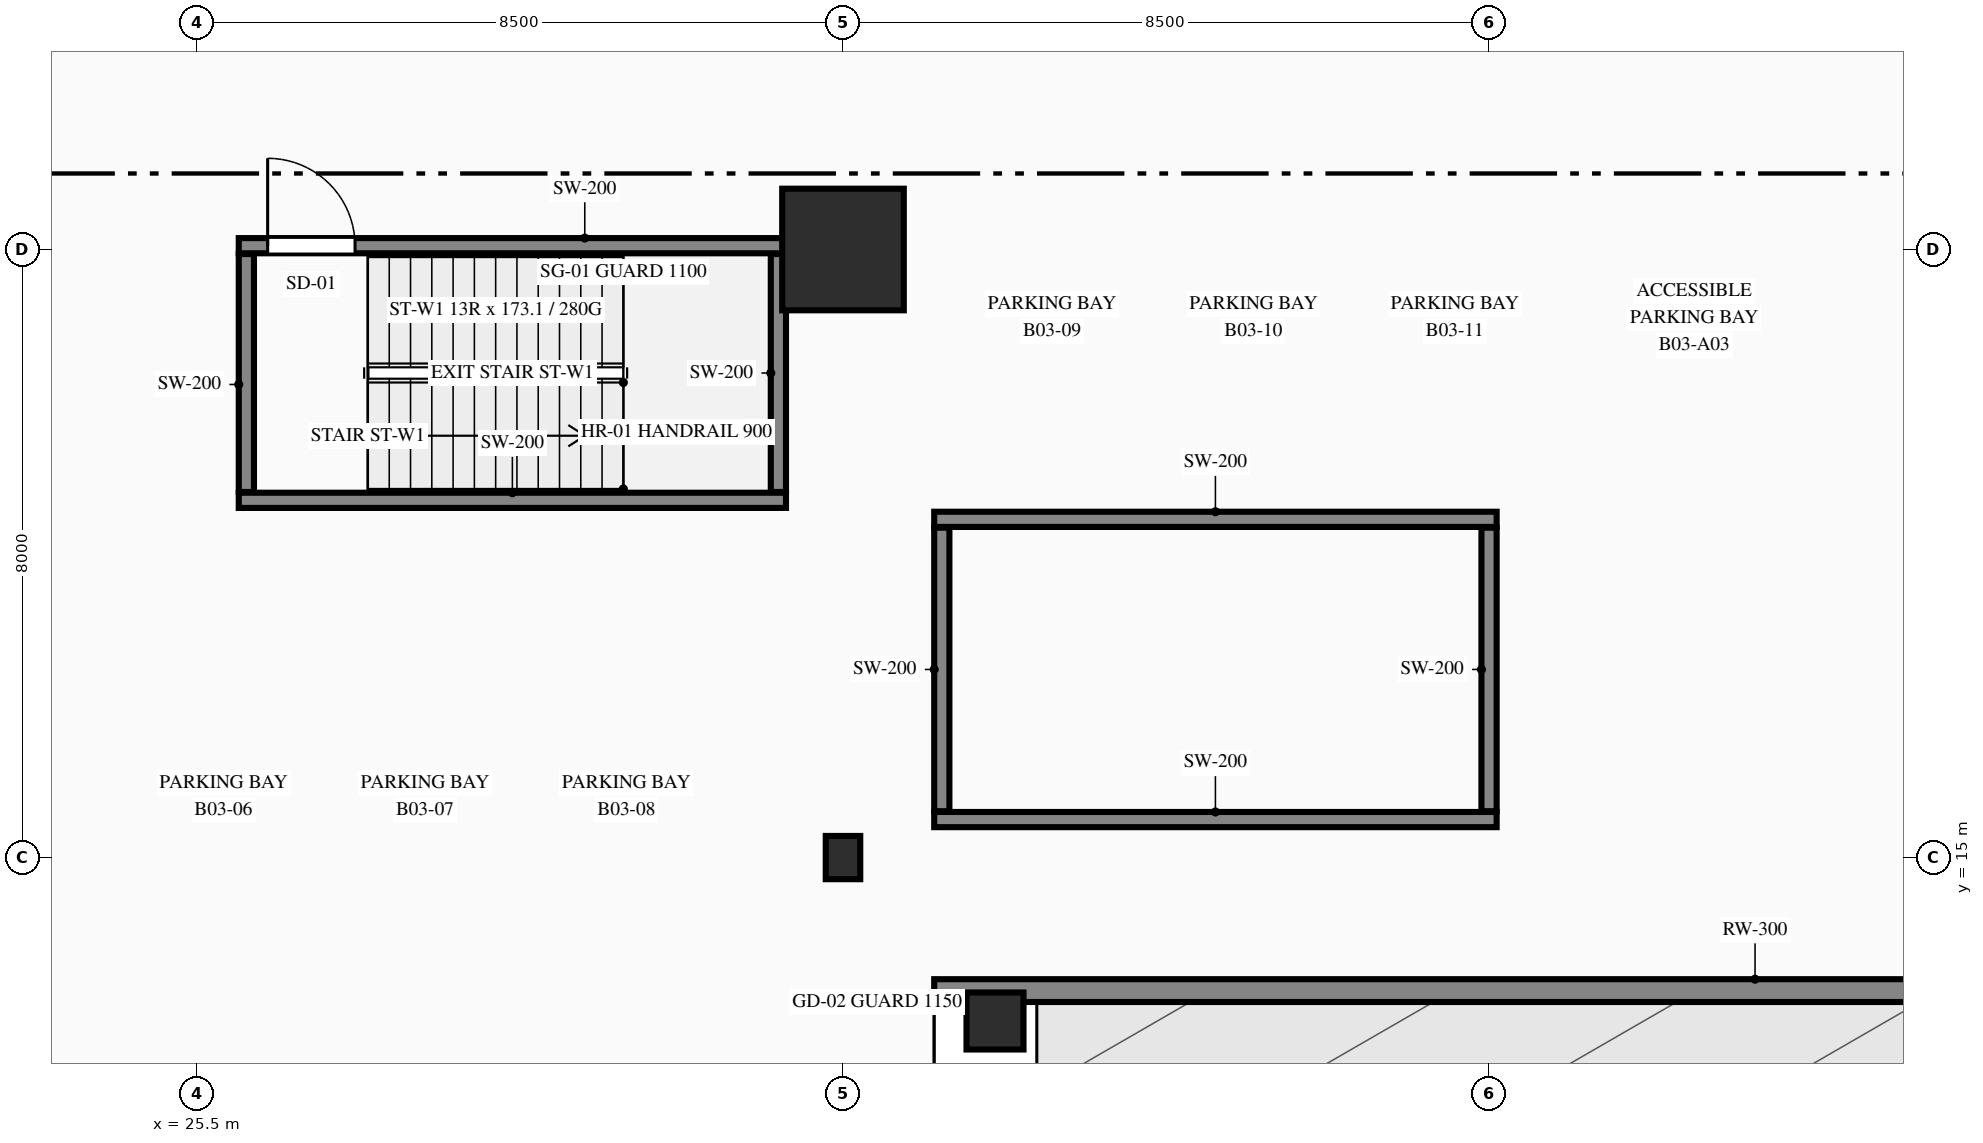
"""IFC4 building model, lengths in metres.
Left out: names, types, materials, properties, quantities, classifications, styles, units other than length and angle.
Written with IfcOpenShell. Run it as: python <this file> out.ifc"""

import sys

from ifc_helpers import new_model, si_unit, direction, frame, frame_2d, origin, origin_2d, place, context, subcontext, project, spatial, rectangle, i_section, extrude, element, fill, save


model = new_model("IFC4")
c1 = context("Model", 3, precision=1e-05, world=origin(), true_north=direction((0.0, 1.0)))
c2 = subcontext(c1, "Body", "Model", "MODEL_VIEW")
j1 = project(units=[si_unit("LENGTHUNIT", "METRE"), si_unit("PLANEANGLEUNIT", "RADIAN")], contexts=[c1])
p1 = place(None, origin())
s1 = spatial("IfcSite", under=j1, at=p1, CompositionType="ELEMENT")
p2 = place(p1, origin())
s2 = spatial("IfcBuilding", under=s1, at=p2, CompositionType="ELEMENT")
p3 = place(p2, frame((0.0, 0.0, -13.5)))
s3 = spatial("IfcBuildingStorey", under=s2, at=p3, CompositionType="ELEMENT", Elevation=-13.5)
p4 = place(p3, frame((26.05, 19.7, 0.0), z_axis=(0.0, 0.0, 1.0), x_axis=(1.0, 0.0, 0.0)))
e1 = element("IfcWall", 1, at=p4, inside=s3, PredefinedType="SHEAR", context=c2, shape_type="SweptSolid", body=[
    extrude(rectangle(XDim=7.2, YDim=0.2, at=frame_2d((3.6, 0.0))), origin(), (0.0, 0.0, 1.0), 4.5),
])
p5 = place(p3, frame((26.05, 23.05, 0.0), z_axis=(0.0, 0.0, 1.0), x_axis=(1.0, 0.0, 0.0)))
e2 = element("IfcWall", 2, at=p5, inside=s3, PredefinedType="SHEAR", context=c2, shape_type="SweptSolid", body=[
    extrude(rectangle(XDim=7.2, YDim=0.2, at=frame_2d((3.6, 0.0))), origin(), (0.0, 0.0, 1.0), 4.5),
])
p6 = place(p5, frame((0.38, 0.0, 0.0)))
e3 = element("IfcOpeningElement", 3, at=p6, cuts=e2, PredefinedType="OPENING", context=c2, shape_type="SweptSolid", body=[
    extrude(rectangle(XDim=1.15, YDim=2.2, at=frame_2d((0.575, 1.1))), frame((0.0, 0.11, 0.0), z_axis=(0.0, -1.0, 0.0), x_axis=(1.0, 0.0, 0.0)), (0.0, 0.0, 1.0), 0.22),
])
for number, where, z_axis, x_axis in (
    (4, (26.15, 19.81, 0.0), (0.0, 0.0, 1.0), (0.0, 1.0, 0.0)),
    (5, (33.15, 19.81, 0.0), (0.0, 0.0, 1.0), (0.0, 1.0, 0.0)),
):
    element("IfcWall", number, at=place(p3, frame(where, z_axis=z_axis, x_axis=x_axis)), inside=s3, PredefinedType="SHEAR", context=c2, shape_type="SweptSolid", body=[
        extrude(rectangle(XDim=3.13, YDim=0.2, at=frame_2d((1.565, 0.0))), origin(), (0.0, 0.0, 1.0), 4.5),
    ])
for number, where, z_axis, x_axis in (
    (6, (35.2, 15.5, 0.0), (0.0, 0.0, 1.0), (1.0, 0.0, 0.0)),
    (7, (35.2, 19.45, 0.0), (0.0, 0.0, 1.0), (1.0, 0.0, 0.0)),
):
    element("IfcWall", number, at=place(p3, frame(where, z_axis=z_axis, x_axis=x_axis)), inside=s3, PredefinedType="SHEAR", context=c2, shape_type="SweptSolid", body=[
        extrude(rectangle(XDim=7.4, YDim=0.2, at=frame_2d((3.7, 0.0))), origin(), (0.0, 0.0, 1.0), 4.5),
    ])
for number, where, z_axis, x_axis in (
    (8, (35.3, 15.61, 0.0), (0.0, 0.0, 1.0), (0.0, 1.0, 0.0)),
    (9, (42.5, 15.61, 0.0), (0.0, 0.0, 1.0), (0.0, 1.0, 0.0)),
):
    element("IfcWall", number, at=place(p3, frame(where, z_axis=z_axis, x_axis=x_axis)), inside=s3, PredefinedType="SHEAR", context=c2, shape_type="SweptSolid", body=[
        extrude(rectangle(XDim=3.73, YDim=0.2, at=frame_2d((1.865, 0.0))), origin(), (0.0, 0.0, 1.0), 4.5),
    ])
p7 = place(p3, frame((34.0, 15.0, 0.0), z_axis=(0.0, 0.0, 1.0), x_axis=(1.0, 0.0, 0.0)))
e10 = element("IfcColumn", 10, at=p7, inside=s3, PredefinedType="COLUMN", context=c2, shape_type="SweptSolid", body=[
    extrude(i_section(OverallWidth=0.454, OverallDepth=0.569, WebThickness=0.078, FlangeThickness=0.08, FilletRadius=0.015, at=origin_2d()), origin(), (0.0, 0.0, 1.0), 4.5),
])
p8 = place(p3, frame((34.0, 23.0, 0.0), z_axis=(0.0, 0.0, 1.0), x_axis=(1.0, 0.0, 0.0)))
e11 = element("IfcColumn", 11, at=p8, inside=s3, PredefinedType="COLUMN", context=c2, shape_type="SweptSolid", body=[
    extrude(rectangle(XDim=1.6, YDim=1.6, at=origin_2d()), origin(), (0.0, 0.0, 1.0), 4.5),
])
p9 = place(p3, frame((36.0, 12.85, 0.0), z_axis=(0.0, 0.0, 1.0), x_axis=(1.0, 0.0, 0.0)))
e12 = element("IfcColumn", 12, at=p9, inside=s3, PredefinedType="COLUMN", context=c2, shape_type="SweptSolid", body=[
    extrude(rectangle(XDim=0.75, YDim=0.75, at=origin_2d()), origin(), (0.0, 0.0, 1.0), 4.2),
])
p10 = place(p3, frame((35.2, 13.25, 0.0), z_axis=(0.0, 0.0, 1.0), x_axis=(1.0, 0.0, 0.0)))
e13 = element("IfcWall", 13, at=p10, inside=s3, PredefinedType="SOLIDWALL", context=c2, shape_type="SweptSolid", body=[
    extrude(rectangle(XDim=21.6, YDim=0.3, at=frame_2d((10.8, 0.0))), origin(), (0.0, 0.0, 1.0), 4.5),
])
p11 = place(p6, origin())
e14 = element("IfcDoor", 14, at=p11, inside=s3, OperationType="SINGLE_SWING_LEFT", PredefinedType="DOOR", context=c2, shape_type="SweptSolid", body=[
    extrude(rectangle(XDim=1.15, YDim=2.2, at=frame_2d((0.575, 1.1))), frame((0.0, 0.025, 0.0), z_axis=(0.0, -1.0, 0.0), x_axis=(1.0, 0.0, 0.0)), (0.0, 0.0, 1.0), 0.05),
])
fill(e3, e14)
save(model, sys.argv[1])
